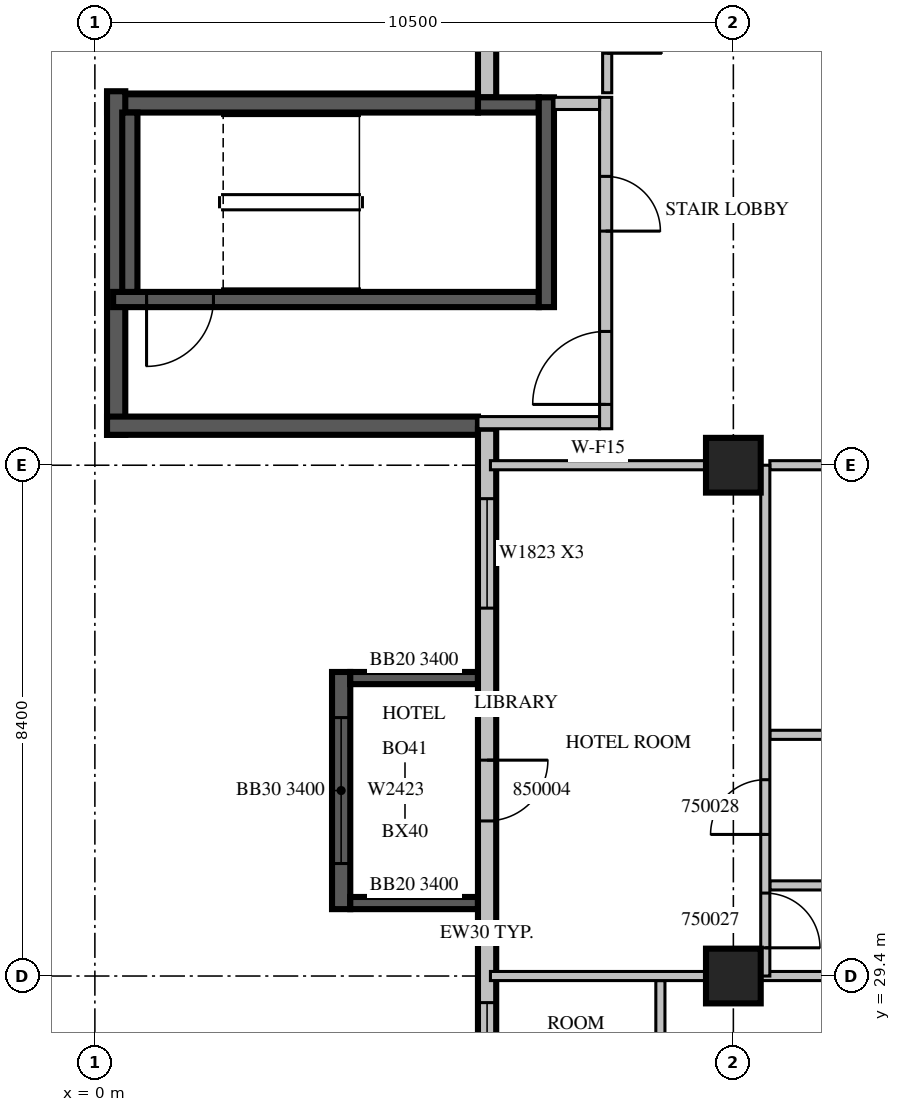
"""IFC4 building model, lengths in metres.
Left out: names, types, materials, properties, quantities, classifications, styles, units other than length and angle.
Written with IfcOpenShell. Run it as: python <this file> out.ifc"""

import sys

from ifc_helpers import new_model, si_unit, direction, frame, frame_2d, origin, origin_2d, place, context, subcontext, project, spatial, rectangle, extrude, source, transform, mapped, element, fill, save


model = new_model("IFC4")
c1 = context("Model", 3, precision=1e-05, world=origin(), true_north=direction((0.0, 1.0)))
c2 = subcontext(c1, "Body", "Model", "MODEL_VIEW")
j1 = project(units=[si_unit("LENGTHUNIT", "METRE"), si_unit("PLANEANGLEUNIT", "RADIAN")], contexts=[c1])
p1 = place(None, origin())
s1 = spatial("IfcSite", under=j1, at=p1, CompositionType="ELEMENT")
p2 = place(p1, origin())
s2 = spatial("IfcBuilding", under=s1, at=p2, CompositionType="ELEMENT")
p3 = place(p2, frame((0.0, 0.0, 223.4)))
s3 = spatial("IfcBuildingStorey", under=s2, at=p3, CompositionType="ELEMENT", Elevation=223.4)
m1 = source(origin(), c2, "Body", "SweptSolid", [
    extrude(rectangle(XDim=0.9, YDim=0.9, at=origin_2d()), origin(), (0.0, 0.0, 1.0), 3.8),
])
for number, where, z_axis, x_axis in (
    (1, (10.5, 29.4, 0.0), (0.0, 0.0, 1.0), (1.0, 0.0, 0.0)),
    (2, (10.5, 37.8, 0.0), (0.0, 0.0, 1.0), (1.0, 0.0, 0.0)),
):
    element("IfcColumn", number, at=place(p3, frame(where, z_axis=z_axis, x_axis=x_axis)), inside=s3, PredefinedType="COLUMN", context=c2, shape_type="MappedRepresentation", body=[
        mapped(m1, transform((0.0, 0.0, 0.0), scale=1.0)),
    ])
m2 = source(origin(), c2, "Body", "SweptSolid", [
    extrude(rectangle(XDim=3.9, YDim=0.3, at=frame_2d((1.95, 0.0))), origin(), (0.0, 0.0, 1.0), 3.4),
])
p4 = place(p3, frame((4.05, 34.4, 0.0), z_axis=(0.0, 0.0, 1.0), x_axis=(0.0, -1.0, 0.0)))
e3 = element("IfcWall", 3, at=p4, inside=s3, PredefinedType="SOLIDWALL", context=c2, shape_type="MappedRepresentation", body=[
    mapped(m2, transform((0.0, 0.0, 0.0), scale=1.0)),
])
m3 = source(origin(), c2, "Body", "SweptSolid", [
    extrude(rectangle(XDim=2.4, YDim=2.3, at=frame_2d((1.2, 1.15))), frame((0.0, 0.16, 0.0), z_axis=(0.0, -1.0, 0.0), x_axis=(1.0, 0.0, 0.0)), (0.0, 0.0, 1.0), 0.32),
])
p5 = place(p4, frame((0.75, 0.0, 0.6)))
e4 = element("IfcOpeningElement", 4, at=p5, cuts=e3, PredefinedType="OPENING", context=c2, shape_type="MappedRepresentation", body=[
    mapped(m3, transform((0.0, 0.0, 0.0), scale=1.0)),
])
m4 = source(origin(), c2, "Body", "SweptSolid", [
    extrude(rectangle(XDim=2.1, YDim=0.2, at=frame_2d((1.05, 0.0))), origin(), (0.0, 0.0, 1.0), 3.4),
])
for number, where, z_axis, x_axis in (
    (5, (6.3, 34.3, 0.0), (0.0, 0.0, 1.0), (-1.0, 0.0, 0.0)),
    (6, (6.3, 30.6, 0.0), (0.0, 0.0, 1.0), (-1.0, 0.0, 0.0)),
):
    element("IfcWall", number, at=place(p3, frame(where, z_axis=z_axis, x_axis=x_axis)), inside=s3, PredefinedType="SOLIDWALL", context=c2, shape_type="MappedRepresentation", body=[
        mapped(m4, transform((0.0, 0.0, 0.0), scale=1.0)),
    ])
m5 = source(origin(), c2, "Body", "SweptSolid", [
    extrude(rectangle(XDim=9.91, YDim=0.3, at=frame_2d((4.955, 0.0))), origin(), (0.0, 0.0, 1.0), 3.4),
])
p6 = place(p3, frame((6.45, 53.76, 0.0), z_axis=(0.0, 0.0, 1.0), x_axis=(0.0, -1.0, 0.0)))
e7 = element("IfcWall", 7, at=p6, inside=s3, PredefinedType="STANDARD", context=c2, shape_type="MappedRepresentation", body=[
    mapped(m5, transform((0.0, 0.0, 0.0), scale=1.0)),
])
m6 = source(origin(), c2, "Body", "SweptSolid", [
    extrude(rectangle(XDim=3.6, YDim=2.3, at=frame_2d((1.8, 1.15))), frame((0.0, 0.16, 0.0), z_axis=(0.0, -1.0, 0.0), x_axis=(1.0, 0.0, 0.0)), (0.0, 0.0, 1.0), 0.32),
])
p7 = place(p6, frame((3.39, 0.0, 0.6)))
e8 = element("IfcOpeningElement", 8, at=p7, cuts=e7, PredefinedType="OPENING", context=c2, shape_type="MappedRepresentation", body=[
    mapped(m6, transform((0.0, 0.0, 0.0), scale=1.0)),
])
p8 = place(p6, frame((0.495, 0.0, 0.6)))
e9 = element("IfcOpeningElement", 9, at=p8, cuts=e7, PredefinedType="OPENING", context=c2, shape_type="MappedRepresentation", body=[
    mapped(m3, transform((0.0, 0.0, 0.0), scale=1.0)),
])
m7 = source(origin(), c2, "Body", "SweptSolid", [
    extrude(rectangle(XDim=6.1, YDim=0.3, at=frame_2d((3.05, 0.0))), origin(), (0.0, 0.0, 1.0), 3.4),
])
p9 = place(p3, frame((6.3, 43.75, 0.0), z_axis=(0.0, 0.0, 1.0), x_axis=(-1.0, 0.0, 0.0)))
e10 = element("IfcWall", 10, at=p9, inside=s3, PredefinedType="SOLIDWALL", context=c2, shape_type="MappedRepresentation", body=[
    mapped(m7, transform((0.0, 0.0, 0.0), scale=1.0)),
])
m8 = source(origin(), c2, "Body", "SweptSolid", [
    extrude(rectangle(XDim=5.65, YDim=0.3, at=frame_2d((2.825, 0.0))), origin(), (0.0, 0.0, 1.0), 3.4),
])
p10 = place(p3, frame((0.35, 43.95, 0.0), z_axis=(0.0, 0.0, 1.0), x_axis=(0.0, -1.0, 0.0)))
e11 = element("IfcWall", 11, at=p10, inside=s3, PredefinedType="SOLIDWALL", context=c2, shape_type="MappedRepresentation", body=[
    mapped(m8, transform((0.0, 0.0, 0.0), scale=1.0)),
])
p11 = place(p3, frame((0.2, 38.45, 0.0), z_axis=(0.0, 0.0, 1.0), x_axis=(1.0, 0.0, 0.0)))
e12 = element("IfcWall", 12, at=p11, inside=s3, PredefinedType="SOLIDWALL", context=c2, shape_type="MappedRepresentation", body=[
    mapped(m7, transform((0.0, 0.0, 0.0), scale=1.0)),
])
m9 = source(origin(), c2, "Body", "SweptSolid", [
    extrude(rectangle(XDim=16.6, YDim=0.3, at=frame_2d((8.3, 0.0))), origin(), (0.0, 0.0, 1.0), 3.4),
])
p12 = place(p3, frame((6.45, 38.4, 0.0), z_axis=(0.0, 0.0, 1.0), x_axis=(0.0, -1.0, 0.0)))
e13 = element("IfcWall", 13, at=p12, inside=s3, PredefinedType="STANDARD", context=c2, shape_type="MappedRepresentation", body=[
    mapped(m9, transform((0.0, 0.0, 0.0), scale=1.0)),
])
m10 = source(origin(), c2, "Body", "SweptSolid", [
    extrude(rectangle(XDim=1.8, YDim=2.3, at=frame_2d((0.9, 1.15))), frame((0.0, 0.16, 0.0), z_axis=(0.0, -1.0, 0.0), x_axis=(1.0, 0.0, 0.0)), (0.0, 0.0, 1.0), 0.32),
])
p13 = place(p12, frame((1.15, 0.0, 0.6)))
e14 = element("IfcOpeningElement", 14, at=p13, cuts=e13, PredefinedType="OPENING", context=c2, shape_type="MappedRepresentation", body=[
    mapped(m10, transform((0.0, 0.0, 0.0), scale=1.0)),
])
p14 = place(p12, frame((9.438, 0.0, 0.6)))
e15 = element("IfcOpeningElement", 15, at=p14, cuts=e13, PredefinedType="OPENING", context=c2, shape_type="MappedRepresentation", body=[
    mapped(m10, transform((0.0, 0.0, 0.0), scale=1.0)),
])
p15 = place(p12, frame((13.637, 0.0, 0.6)))
e16 = element("IfcOpeningElement", 16, at=p15, cuts=e13, PredefinedType="OPENING", context=c2, shape_type="MappedRepresentation", body=[
    mapped(m10, transform((0.0, 0.0, 0.0), scale=1.0)),
])
m11 = source(origin(), c2, "Body", "SweptSolid", [
    extrude(rectangle(XDim=1.0, YDim=2.1, at=frame_2d((0.5, 1.05))), frame((0.0, 0.16, 0.0), z_axis=(0.0, -1.0, 0.0), x_axis=(1.0, 0.0, 0.0)), (0.0, 0.0, 1.0), 0.32),
])
p16 = place(p12, frame((5.45, 0.0, 0.0)))
e17 = element("IfcOpeningElement", 17, at=p16, cuts=e13, PredefinedType="OPENING", context=c2, shape_type="MappedRepresentation", body=[
    mapped(m11, transform((0.0, 0.0, 0.0), scale=1.0)),
])
m12 = source(origin(), c2, "Body", "SweptSolid", [
    extrude(rectangle(XDim=7.0, YDim=0.25, at=frame_2d((3.5, 0.0))), origin(), (0.0, 0.0, 1.0), 3.4),
])
p17 = place(p3, frame((0.3, 40.525, 0.0), z_axis=(0.0, 0.0, 1.0), x_axis=(1.0, 0.0, 0.0)))
e18 = element("IfcWall", 18, at=p17, inside=s3, PredefinedType="SOLIDWALL", context=c2, shape_type="MappedRepresentation", body=[
    mapped(m12, transform((0.0, 0.0, 0.0), scale=1.0)),
])
m13 = source(origin(), c2, "Body", "SweptSolid", [
    extrude(rectangle(XDim=1.1, YDim=2.1, at=frame_2d((0.55, 1.05))), frame((0.0, 0.135, 0.0), z_axis=(0.0, -1.0, 0.0), x_axis=(1.0, 0.0, 0.0)), (0.0, 0.0, 1.0), 0.27),
])
p18 = place(p17, frame((0.55, 0.0, 0.0)))
e19 = element("IfcOpeningElement", 19, at=p18, cuts=e18, PredefinedType="OPENING", context=c2, shape_type="MappedRepresentation", body=[
    mapped(m13, transform((0.0, 0.0, 0.0), scale=1.0)),
])
m14 = source(origin(), c2, "Body", "SweptSolid", [
    extrude(rectangle(XDim=1.0, YDim=0.25, at=frame_2d((0.5, 0.0))), origin(), (0.0, 0.0, 1.0), 3.4),
])
p19 = place(p3, frame((6.3, 43.725, 0.0), z_axis=(0.0, 0.0, 1.0), x_axis=(1.0, 0.0, 0.0)))
e20 = element("IfcWall", 20, at=p19, inside=s3, PredefinedType="SOLIDWALL", context=c2, shape_type="MappedRepresentation", body=[
    mapped(m14, transform((0.0, 0.0, 0.0), scale=1.0)),
])
m15 = source(origin(), c2, "Body", "SweptSolid", [
    extrude(rectangle(XDim=3.45, YDim=0.25, at=frame_2d((1.725, 0.0))), origin(), (0.0, 0.0, 1.0), 3.4),
])
p20 = place(p3, frame((7.425, 40.4, 0.0), z_axis=(0.0, 0.0, 1.0), x_axis=(0.0, 1.0, 0.0)))
e21 = element("IfcWall", 21, at=p20, inside=s3, PredefinedType="SOLIDWALL", context=c2, shape_type="MappedRepresentation", body=[
    mapped(m15, transform((0.0, 0.0, 0.0), scale=1.0)),
])
m16 = source(origin(), c2, "Body", "SweptSolid", [
    extrude(rectangle(XDim=2.95, YDim=0.25, at=frame_2d((1.475, 0.0))), origin(), (0.0, 0.0, 1.0), 3.4),
])
p21 = place(p3, frame((0.575, 40.65, 0.0), z_axis=(0.0, 0.0, 1.0), x_axis=(0.0, 1.0, 0.0)))
e22 = element("IfcWall", 22, at=p21, inside=s3, PredefinedType="SOLIDWALL", context=c2, shape_type="MappedRepresentation", body=[
    mapped(m16, transform((0.0, 0.0, 0.0), scale=1.0)),
])
m17 = source(origin(), c2, "Body", "SweptSolid", [
    extrude(rectangle(XDim=2.0, YDim=0.2, at=frame_2d((1.0, 0.0))), origin(), (0.0, 0.0, 1.0), 3.4),
])
p22 = place(p3, frame((6.3, 38.5, 0.0), z_axis=(0.0, 0.0, 1.0), x_axis=(1.0, 0.0, 0.0)))
e23 = element("IfcWall", 23, at=p22, inside=s3, PredefinedType="PARTITIONING", context=c2, shape_type="MappedRepresentation", body=[
    mapped(m17, transform((0.0, 0.0, 0.0), scale=1.0)),
])
m18 = source(origin(), c2, "Body", "SweptSolid", [
    extrude(rectangle(XDim=5.45, YDim=0.2, at=frame_2d((2.725, 0.0))), origin(), (0.0, 0.0, 1.0), 3.4),
])
p23 = place(p3, frame((8.4, 38.4, 0.0), z_axis=(0.0, 0.0, 1.0), x_axis=(0.0, 1.0, 0.0)))
e24 = element("IfcWall", 24, at=p23, inside=s3, PredefinedType="PARTITIONING", context=c2, shape_type="MappedRepresentation", body=[
    mapped(m18, transform((0.0, 0.0, 0.0), scale=1.0)),
])
m19 = source(origin(), c2, "Body", "SweptSolid", [
    extrude(rectangle(XDim=1.2, YDim=2.1, at=frame_2d((0.6, 1.05))), frame((0.0, 0.11, 0.0), z_axis=(0.0, -1.0, 0.0), x_axis=(1.0, 0.0, 0.0)), (0.0, 0.0, 1.0), 0.22),
])
p24 = place(p23, frame((0.4, 0.0, 0.0)))
e25 = element("IfcOpeningElement", 25, at=p24, cuts=e24, PredefinedType="OPENING", context=c2, shape_type="MappedRepresentation", body=[
    mapped(m19, transform((0.0, 0.0, 0.0), scale=1.0)),
])
m20 = source(origin(), c2, "Body", "SweptSolid", [
    extrude(rectangle(XDim=0.9, YDim=2.1, at=frame_2d((0.45, 1.05))), frame((0.0, 0.11, 0.0), z_axis=(0.0, -1.0, 0.0), x_axis=(1.0, 0.0, 0.0)), (0.0, 0.0, 1.0), 0.22),
])
p25 = place(p23, frame((3.25, 0.0, 0.0)))
e26 = element("IfcOpeningElement", 26, at=p25, cuts=e24, PredefinedType="OPENING", context=c2, shape_type="MappedRepresentation", body=[
    mapped(m20, transform((0.0, 0.0, 0.0), scale=1.0)),
])
m21 = source(origin(), c2, "Body", "SweptSolid", [
    extrude(rectangle(XDim=0.75, YDim=0.2, at=frame_2d((0.375, 0.0))), origin(), (0.0, 0.0, 1.0), 3.4),
])
p26 = place(p3, frame((7.55, 43.75, 0.0), z_axis=(0.0, 0.0, 1.0), x_axis=(1.0, 0.0, 0.0)))
e27 = element("IfcWall", 27, at=p26, inside=s3, PredefinedType="PARTITIONING", context=c2, shape_type="MappedRepresentation", body=[
    mapped(m21, transform((0.0, 0.0, 0.0), scale=1.0)),
])
m22 = source(origin(), c2, "Body", "SweptSolid", [
    extrude(rectangle(XDim=4.05, YDim=0.15, at=frame_2d((2.025, 0.0))), origin(), (0.0, 0.0, 1.0), 3.4),
])
p27 = place(p3, frame((9.3, 25.275, 0.0), z_axis=(0.0, 0.0, 1.0), x_axis=(0.0, 1.0, 0.0)))
e28 = element("IfcWall", 28, at=p27, inside=s3, PredefinedType="PARTITIONING", context=c2, shape_type="MappedRepresentation", body=[
    mapped(m22, transform((0.0, 0.0, 0.0), scale=1.0)),
])
m23 = source(origin(), c2, "Body", "SweptSolid", [
    extrude(rectangle(XDim=3.546, YDim=0.15, at=frame_2d((1.773, 0.0))), origin(), (0.0, 0.0, 1.0), 3.4),
])
p28 = place(p3, frame((10.051, 29.4, 0.0), z_axis=(0.0, 0.0, 1.0), x_axis=(-1.0, 0.0, 0.0)))
e29 = element("IfcWall", 29, at=p28, inside=s3, PredefinedType="PARTITIONING", context=c2, shape_type="MappedRepresentation", body=[
    mapped(m23, transform((0.0, 0.0, 0.0), scale=1.0)),
])
m24 = source(origin(), c2, "Body", "SweptSolid", [
    extrude(rectangle(XDim=4.051, YDim=0.15, at=frame_2d((2.026, 0.0))), origin(), (0.0, 0.0, 1.0), 3.4),
])
p29 = place(p3, frame((15.0, 29.4, 0.0), z_axis=(0.0, 0.0, 1.0), x_axis=(-1.0, 0.0, 0.0)))
e30 = element("IfcWall", 30, at=p29, inside=s3, PredefinedType="PARTITIONING", context=c2, shape_type="MappedRepresentation", body=[
    mapped(m24, transform((0.0, 0.0, 0.0), scale=1.0)),
])
m25 = source(origin(), c2, "Body", "SweptSolid", [
    extrude(rectangle(XDim=2.2, YDim=0.15, at=frame_2d((1.1, 0.0))), origin(), (0.0, 0.0, 1.0), 3.4),
])
p30 = place(p3, frame((8.425, 43.925, 0.0), z_axis=(0.0, 0.0, 1.0), x_axis=(0.0, 1.0, 0.0)))
e31 = element("IfcWall", 31, at=p30, inside=s3, PredefinedType="PARTITIONING", context=c2, shape_type="MappedRepresentation", body=[
    mapped(m25, transform((0.0, 0.0, 0.0), scale=1.0)),
])
m26 = source(origin(), c2, "Body", "SweptSolid", [
    extrude(rectangle(XDim=0.9, YDim=2.1, at=frame_2d((0.45, 1.05))), frame((0.0, 0.085, 0.0), z_axis=(0.0, -1.0, 0.0), x_axis=(1.0, 0.0, 0.0)), (0.0, 0.0, 1.0), 0.17),
])
p31 = place(p30, frame((0.65, 0.0, 0.0)))
e32 = element("IfcOpeningElement", 32, at=p31, cuts=e31, PredefinedType="OPENING", context=c2, shape_type="MappedRepresentation", body=[
    mapped(m26, transform((0.0, 0.0, 0.0), scale=1.0)),
])
m27 = source(origin(), c2, "Body", "SweptSolid", [
    extrude(rectangle(XDim=3.9, YDim=0.15, at=frame_2d((1.95, 0.0))), origin(), (0.0, 0.0, 1.0), 3.4),
])
for number, where, z_axis, x_axis in (
    (33, (15.0, 30.89, 0.0), (0.0, 0.0, 1.0), (-1.0, 0.0, 0.0)),
    (34, (15.0, 33.367, 0.0), (0.0, 0.0, 1.0), (-1.0, 0.0, 0.0)),
):
    element("IfcWall", number, at=place(p3, frame(where, z_axis=z_axis, x_axis=x_axis)), inside=s3, PredefinedType="PARTITIONING", context=c2, shape_type="MappedRepresentation", body=[
        mapped(m27, transform((0.0, 0.0, 0.0), scale=1.0)),
    ])
p32 = place(p3, frame((10.051, 37.8, 0.0), z_axis=(0.0, 0.0, 1.0), x_axis=(-1.0, 0.0, 0.0)))
e35 = element("IfcWall", 35, at=p32, inside=s3, PredefinedType="PARTITIONING", context=c2, shape_type="MappedRepresentation", body=[
    mapped(m23, transform((0.0, 0.0, 0.0), scale=1.0)),
])
p33 = place(p3, frame((15.0, 37.8, 0.0), z_axis=(0.0, 0.0, 1.0), x_axis=(-1.0, 0.0, 0.0)))
e36 = element("IfcWall", 36, at=p33, inside=s3, PredefinedType="PARTITIONING", context=c2, shape_type="MappedRepresentation", body=[
    mapped(m27, transform((0.0, 0.0, 0.0), scale=1.0)),
])
m28 = source(origin(), c2, "Body", "SweptSolid", [
    extrude(rectangle(XDim=8.4, YDim=0.15, at=frame_2d((4.2, 0.0))), origin(), (0.0, 0.0, 1.0), 3.4),
])
p34 = place(p3, frame((11.025, 29.4, 0.0), z_axis=(0.0, 0.0, 1.0), x_axis=(0.0, 1.0, 0.0)))
e37 = element("IfcWall", 37, at=p34, inside=s3, PredefinedType="PARTITIONING", context=c2, shape_type="MappedRepresentation", body=[
    mapped(m28, transform((0.0, 0.0, 0.0), scale=1.0)),
])
p35 = place(p34, frame((0.464, 0.0, 0.0)))
e38 = element("IfcOpeningElement", 38, at=p35, cuts=e37, PredefinedType="OPENING", context=c2, shape_type="MappedRepresentation", body=[
    mapped(m26, transform((0.0, 0.0, 0.0), scale=1.0)),
])
p36 = place(p34, frame((2.328, 0.0, 0.0)))
e39 = element("IfcOpeningElement", 39, at=p36, cuts=e37, PredefinedType="OPENING", context=c2, shape_type="MappedRepresentation", body=[
    mapped(m26, transform((0.0, 0.0, 0.0), scale=1.0)),
])
m29 = source(origin(), c2, "Body", "SweptSolid", [
    extrude(rectangle(XDim=2.4, YDim=2.3, at=frame_2d((1.2, 1.15))), frame((0.0, 0.03, 0.0), z_axis=(0.0, -1.0, 0.0), x_axis=(1.0, 0.0, 0.0)), (0.0, 0.0, 1.0), 0.06),
])
p37 = place(p5, origin())
e40 = element("IfcWindow", 40, at=p37, inside=s3, PartitioningType="SINGLE_PANEL", PredefinedType="WINDOW", context=c2, shape_type="MappedRepresentation", body=[
    mapped(m29, transform((0.0, 0.0, 0.0), scale=1.0)),
])
fill(e4, e40)
m30 = source(origin(), c2, "Body", "SweptSolid", [
    extrude(rectangle(XDim=1.8, YDim=2.3, at=frame_2d((0.9, 1.15))), frame((0.0, 0.03, 0.0), z_axis=(0.0, -1.0, 0.0), x_axis=(1.0, 0.0, 0.0)), (0.0, 0.0, 1.0), 0.06),
])
p38 = place(p13, origin())
e41 = element("IfcWindow", 41, at=p38, inside=s3, PartitioningType="SINGLE_PANEL", PredefinedType="WINDOW", context=c2, shape_type="MappedRepresentation", body=[
    mapped(m30, transform((0.0, 0.0, 0.0), scale=1.0)),
])
fill(e14, e41)
p39 = place(p14, origin())
e42 = element("IfcWindow", 42, at=p39, inside=s3, PartitioningType="SINGLE_PANEL", PredefinedType="WINDOW", context=c2, shape_type="MappedRepresentation", body=[
    mapped(m30, transform((0.0, 0.0, 0.0), scale=1.0)),
])
fill(e15, e42)
m31 = source(origin(), c2, "Body", "SweptSolid", [
    extrude(rectangle(XDim=1.1, YDim=2.1, at=frame_2d((0.55, 1.05))), frame((0.0, 0.025, 0.0), z_axis=(0.0, -1.0, 0.0), x_axis=(1.0, 0.0, 0.0)), (0.0, 0.0, 1.0), 0.05),
])
p40 = place(p18, origin())
e43 = element("IfcDoor", 43, at=p40, inside=s3, OperationType="SINGLE_SWING_RIGHT", PredefinedType="DOOR", context=c2, shape_type="MappedRepresentation", body=[
    mapped(m31, transform((0.0, 0.0, 0.0), scale=1.0)),
])
fill(e19, e43)
m32 = source(origin(), c2, "Body", "SweptSolid", [
    extrude(rectangle(XDim=1.2, YDim=2.1, at=frame_2d((0.6, 1.05))), frame((0.0, 0.025, 0.0), z_axis=(0.0, -1.0, 0.0), x_axis=(1.0, 0.0, 0.0)), (0.0, 0.0, 1.0), 0.05),
])
p41 = place(p24, origin())
e44 = element("IfcDoor", 44, at=p41, inside=s3, OperationType="SINGLE_SWING_LEFT", PredefinedType="DOOR", context=c2, shape_type="MappedRepresentation", body=[
    mapped(m32, transform((0.0, 0.0, 0.0), scale=1.0)),
])
fill(e25, e44)
m33 = source(origin(), c2, "Body", "SweptSolid", [
    extrude(rectangle(XDim=0.9, YDim=2.1, at=frame_2d((0.45, 1.05))), frame((0.0, 0.025, 0.0), z_axis=(0.0, -1.0, 0.0), x_axis=(1.0, 0.0, 0.0)), (0.0, 0.0, 1.0), 0.05),
])
p42 = place(p25, origin())
e45 = element("IfcDoor", 45, at=p42, inside=s3, OperationType="SINGLE_SWING_RIGHT", PredefinedType="DOOR", context=c2, shape_type="MappedRepresentation", body=[
    mapped(m33, transform((0.0, 0.0, 0.0), scale=1.0)),
])
fill(e26, e45)
p43 = place(p31, origin())
e46 = element("IfcDoor", 46, at=p43, inside=s3, OperationType="SINGLE_SWING_RIGHT", PredefinedType="DOOR", context=c2, shape_type="MappedRepresentation", body=[
    mapped(m33, transform((0.0, 0.0, 0.0), scale=1.0)),
])
fill(e32, e46)
p44 = place(p35, origin())
e47 = element("IfcDoor", 47, at=p44, inside=s3, OperationType="SINGLE_SWING_RIGHT", PredefinedType="DOOR", context=c2, shape_type="MappedRepresentation", body=[
    mapped(m33, transform((0.0, 0.0, 0.0), scale=1.0)),
])
fill(e38, e47)
p45 = place(p36, origin())
e48 = element("IfcDoor", 48, at=p45, inside=s3, OperationType="SINGLE_SWING_LEFT", PredefinedType="DOOR", context=c2, shape_type="MappedRepresentation", body=[
    mapped(m33, transform((0.0, 0.0, 0.0), scale=1.0)),
])
fill(e39, e48)
m34 = source(origin(), c2, "Body", "SweptSolid", [
    extrude(rectangle(XDim=1.0, YDim=2.1, at=frame_2d((0.5, 1.05))), frame((0.0, 0.025, 0.0), z_axis=(0.0, -1.0, 0.0), x_axis=(1.0, 0.0, 0.0)), (0.0, 0.0, 1.0), 0.05),
])
p46 = place(p16, origin())
e49 = element("IfcDoor", 49, at=p46, inside=s3, OperationType="SINGLE_SWING_LEFT", PredefinedType="DOOR", context=c2, shape_type="MappedRepresentation", body=[
    mapped(m34, transform((0.0, 0.0, 0.0), scale=1.0)),
])
fill(e17, e49)
save(model, sys.argv[1])
